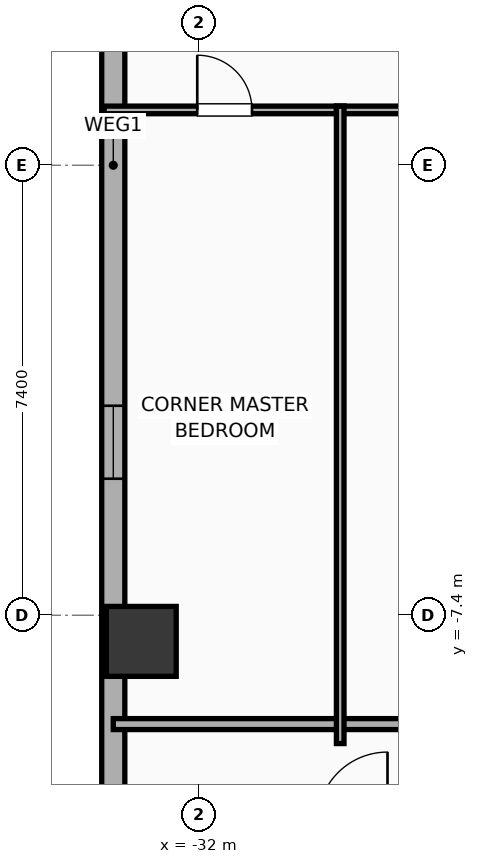
"""IFC4 building model, lengths in metres.
Left out: names, types, materials, properties, quantities, classifications, styles, units other than length and angle.
Written with IfcOpenShell. Run it as: python <this file> out.ifc"""

import sys

from ifc_helpers import new_model, si_unit, direction, frame, frame_2d, origin, origin_2d, place, context, subcontext, project, spatial, rectangle, hollow_rectangle, extrude, element, fill, save


model = new_model("IFC4")
c1 = context("Model", 3, precision=1e-05, world=origin(), true_north=direction((0.0, 1.0)))
c2 = subcontext(c1, "Body", "Model", "MODEL_VIEW")
j1 = project(units=[si_unit("LENGTHUNIT", "METRE"), si_unit("PLANEANGLEUNIT", "RADIAN")], contexts=[c1])
p1 = place(None, origin())
s1 = spatial("IfcSite", under=j1, at=p1, CompositionType="ELEMENT")
p2 = place(p1, origin())
s2 = spatial("IfcBuilding", under=s1, at=p2, CompositionType="ELEMENT")
p3 = place(p2, frame((0.0, 0.0, 29.9)))
s3 = spatial("IfcBuildingStorey", under=s2, at=p3, CompositionType="ELEMENT", Elevation=29.9)
p4 = place(p3, frame((-32.95, -7.83, 0.0), z_axis=(0.0, 0.0, 1.0), x_axis=(1.0, 0.0, 0.0)))
e1 = element("IfcColumn", 1, at=p4, inside=s3, PredefinedType="COLUMN", context=c2, shape_type="SweptSolid", body=[
    extrude(hollow_rectangle(XDim=1.15, YDim=1.15, WallThickness=0.04, at=origin_2d()), origin(), (0.0, 0.0, 1.0), 3.9),
])
p5 = place(p3, frame((-33.41, -18.381, 0.0), z_axis=(0.0, 0.0, 1.0), x_axis=(0.0, 1.0, 0.0)))
e2 = element("IfcWall", 2, at=p5, inside=s3, PredefinedType="ELEMENTEDWALL", context=c2, shape_type="SweptSolid", body=[
    extrude(rectangle(XDim=36.763, YDim=0.38, at=frame_2d((18.381, 0.0))), origin(), (0.0, 0.0, 1.0), 2.54),
])
p6 = place(p5, frame((33.537, 0.0, 0.75)))
e3 = element("IfcOpeningElement", 3, at=p6, cuts=e2, PredefinedType="OPENING", context=c2, shape_type="SweptSolid", body=[
    extrude(rectangle(XDim=1.2, YDim=1.63, at=frame_2d((0.6, 0.815))), frame((0.0, 0.2, 0.0), z_axis=(0.0, -1.0, 0.0), x_axis=(1.0, 0.0, 0.0)), (0.0, 0.0, 1.0), 0.4),
])
p7 = place(p5, frame((22.476, 0.0, 0.75)))
e4 = element("IfcOpeningElement", 4, at=p7, cuts=e2, PredefinedType="OPENING", context=c2, shape_type="SweptSolid", body=[
    extrude(rectangle(XDim=1.2, YDim=1.63, at=frame_2d((0.6, 0.815))), frame((0.0, 0.2, 0.0), z_axis=(0.0, -1.0, 0.0), x_axis=(1.0, 0.0, 0.0)), (0.0, 0.0, 1.0), 0.4),
])
p8 = place(p5, frame((13.226, 0.0, 0.75)))
e5 = element("IfcOpeningElement", 5, at=p8, cuts=e2, PredefinedType="OPENING", context=c2, shape_type="SweptSolid", body=[
    extrude(rectangle(XDim=1.2, YDim=1.63, at=frame_2d((0.6, 0.815))), frame((0.0, 0.2, 0.0), z_axis=(0.0, -1.0, 0.0), x_axis=(1.0, 0.0, 0.0)), (0.0, 0.0, 1.0), 0.4),
])
p9 = place(p3, frame((-33.41, -9.19, 0.0), z_axis=(0.0, 0.0, 1.0), x_axis=(1.0, 0.0, 0.0)))
e6 = element("IfcWall", 6, at=p9, inside=s3, PredefinedType="PARTITIONING", context=c2, shape_type="SweptSolid", body=[
    extrude(rectangle(XDim=23.53, YDim=0.18, at=frame_2d((11.765, 0.0))), origin(), (0.0, 0.0, 1.0), 3.65),
])
p10 = place(p3, frame((-33.56, 0.91, 0.0), z_axis=(0.0, 0.0, 1.0), x_axis=(1.0, 0.0, 0.0)))
e7 = element("IfcWall", 7, at=p10, inside=s3, PredefinedType="PARTITIONING", context=c2, shape_type="SweptSolid", body=[
    extrude(rectangle(XDim=3.945, YDim=0.125, at=frame_2d((1.972, 0.0))), origin(), (0.0, 0.0, 1.0), 3.65),
])
p11 = place(p10, frame((1.531, 0.0, 0.0)))
e8 = element("IfcOpeningElement", 8, at=p11, cuts=e7, PredefinedType="OPENING", context=c2, shape_type="SweptSolid", body=[
    extrude(rectangle(XDim=0.9, YDim=2.05, at=frame_2d((0.45, 1.025))), frame((0.0, 0.073, 0.0), z_axis=(0.0, -1.0, 0.0), x_axis=(1.0, 0.0, 0.0)), (0.0, 0.0, 1.0), 0.145),
])
p12 = place(p3, frame((-29.74, 0.91, 0.0), z_axis=(0.0, 0.0, 1.0), x_axis=(1.0, 0.0, 0.0)))
e9 = element("IfcWall", 9, at=p12, inside=s3, PredefinedType="PARTITIONING", context=c2, shape_type="SweptSolid", body=[
    extrude(rectangle(XDim=3.754, YDim=0.125, at=frame_2d((1.877, 0.0))), origin(), (0.0, 0.0, 1.0), 3.65),
])
p13 = place(p12, frame((1.427, 0.0, 0.0)))
e10 = element("IfcOpeningElement", 10, at=p13, cuts=e9, PredefinedType="OPENING", context=c2, shape_type="SweptSolid", body=[
    extrude(rectangle(XDim=0.9, YDim=2.05, at=frame_2d((0.45, 1.025))), frame((0.0, 0.073, 0.0), z_axis=(0.0, -1.0, 0.0), x_axis=(1.0, 0.0, 0.0)), (0.0, 0.0, 1.0), 0.145),
])
p14 = place(p3, frame((-29.678, -9.51, 0.0), z_axis=(0.0, 0.0, 1.0), x_axis=(0.0, 1.0, 0.0)))
e11 = element("IfcWall", 11, at=p14, inside=s3, PredefinedType="PARTITIONING", context=c2, shape_type="SweptSolid", body=[
    extrude(rectangle(XDim=10.48, YDim=0.125, at=frame_2d((5.24, 0.0))), origin(), (0.0, 0.0, 1.0), 3.65),
])
p15 = place(p8, origin())
e12 = element("IfcWindow", 12, at=p15, inside=s3, PartitioningType="SINGLE_PANEL", PredefinedType="WINDOW", context=c2, shape_type="SweptSolid", body=[
    extrude(rectangle(XDim=1.2, YDim=1.63, at=frame_2d((0.6, 0.815))), frame((0.0, 0.03, 0.0), z_axis=(0.0, -1.0, 0.0), x_axis=(1.0, 0.0, 0.0)), (0.0, 0.0, 1.0), 0.06),
])
fill(e5, e12)
p16 = place(p11, origin())
e13 = element("IfcDoor", 13, at=p16, inside=s3, OperationType="SINGLE_SWING_LEFT", PredefinedType="DOOR", context=c2, shape_type="SweptSolid", body=[
    extrude(rectangle(XDim=0.9, YDim=2.05, at=frame_2d((0.45, 1.025))), frame((0.0, 0.025, 0.0), z_axis=(0.0, -1.0, 0.0), x_axis=(1.0, 0.0, 0.0)), (0.0, 0.0, 1.0), 0.05),
])
fill(e8, e13)
save(model, sys.argv[1])
